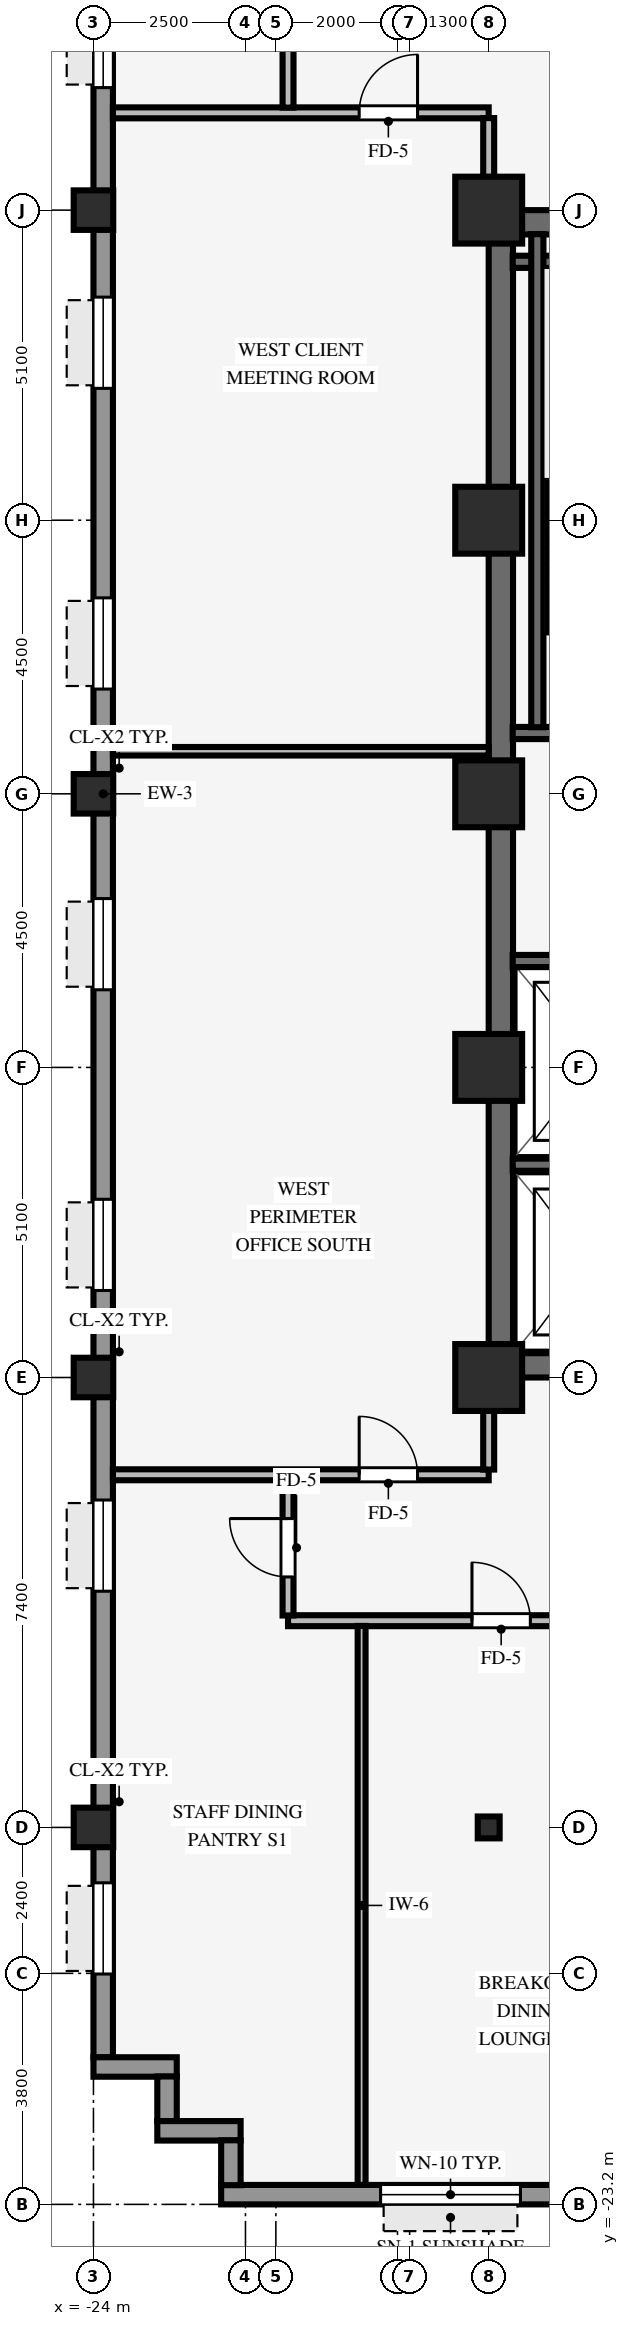
"""IFC4 building model, lengths in metres.
Left out: names, types, materials, properties, quantities, classifications, styles, units other than length and angle.
Written with IfcOpenShell. Run it as: python <this file> out.ifc"""

import sys

from ifc_helpers import new_model, si_unit, direction, frame, frame_2d, origin, origin_2d, place, context, subcontext, project, spatial, rectangle, hollow_rectangle, i_section, extrude, source, transform, mapped, element, fill, save


model = new_model("IFC4")
c1 = context("Model", 3, precision=1e-05, world=origin(), true_north=direction((0.0, 1.0)))
c2 = subcontext(c1, "Body", "Model", "MODEL_VIEW")
j1 = project(units=[si_unit("LENGTHUNIT", "METRE"), si_unit("PLANEANGLEUNIT", "RADIAN")], contexts=[c1])
p1 = place(None, origin())
s1 = spatial("IfcSite", under=j1, at=p1, CompositionType="ELEMENT")
p2 = place(p1, origin())
s2 = spatial("IfcBuilding", under=s1, at=p2, CompositionType="ELEMENT")
p3 = place(p2, frame((0.0, 0.0, 105.6)))
s3 = spatial("IfcBuildingStorey", under=s2, at=p3, CompositionType="ELEMENT", Elevation=105.6)
for number, where, z_axis, x_axis in (
    (1, (-17.5, -9.4, 0.0), (0.0, 0.0, 1.0), (1.0, 0.0, 0.0)),
    (2, (-17.5, 9.4, 0.0), (0.0, 0.0, 1.0), (1.0, 0.0, 0.0)),
):
    element("IfcWall", number, at=place(p3, frame(where, z_axis=z_axis, x_axis=x_axis)), inside=s3, PredefinedType="SHEAR", context=c2, shape_type="SweptSolid", body=[
        extrude(rectangle(XDim=8.5, YDim=0.4, at=frame_2d((4.25, 0.0))), origin(), (0.0, 0.0, 1.0), 3.37),
    ])
p4 = place(p3, frame((-17.3, -9.205, 0.0), z_axis=(0.0, 0.0, 1.0), x_axis=(0.0, 1.0, 0.0)))
e3 = element("IfcWall", 3, at=p4, inside=s3, PredefinedType="SHEAR", context=c2, shape_type="SweptSolid", body=[
    extrude(rectangle(XDim=18.41, YDim=0.4, at=frame_2d((9.205, 0.0))), origin(), (0.0, 0.0, 1.0), 3.37),
])
for number, where, z_axis, x_axis in (
    (4, (-17.5, -9.6, 0.0), (0.0, 0.0, 1.0), (1.0, 0.0, 0.0)),
    (5, (-17.5, -4.5, 0.0), (0.0, 0.0, 1.0), (1.0, 0.0, 0.0)),
    (6, (-17.5, 4.5, 0.0), (0.0, 0.0, 1.0), (1.0, 0.0, 0.0)),
    (7, (-17.5, 9.6, 0.0), (0.0, 0.0, 1.0), (1.0, 0.0, 0.0)),
    (8, (-17.5, 0.0, 0.0), (0.0, 0.0, 1.0), (1.0, 0.0, 0.0)),
):
    element("IfcColumn", number, at=place(p3, frame(where, z_axis=z_axis, x_axis=x_axis)), inside=s3, PredefinedType="COLUMN", context=c2, shape_type="SweptSolid", body=[
        extrude(rectangle(XDim=1.1, YDim=1.1, at=origin_2d()), origin(), (0.0, 0.0, 1.0), 3.37),
    ])
for number, where, z_axis, x_axis in (
    (9, (-24.0, -17.0, 0.0), (0.0, 0.0, 1.0), (1.0, 0.0, 0.0)),
    (10, (-24.0, -9.6, 0.0), (0.0, 0.0, 1.0), (1.0, 0.0, 0.0)),
    (11, (-24.0, 0.0, 0.0), (0.0, 0.0, 1.0), (1.0, 0.0, 0.0)),
    (12, (-24.0, 9.6, 0.0), (0.0, 0.0, 1.0), (1.0, 0.0, 0.0)),
):
    element("IfcColumn", number, at=place(p3, frame(where, z_axis=z_axis, x_axis=x_axis)), inside=s3, PredefinedType="COLUMN", context=c2, shape_type="SweptSolid", body=[
        extrude(hollow_rectangle(XDim=0.65, YDim=0.65, WallThickness=0.04, InnerFilletRadius=0.04, OuterFilletRadius=0.08, at=origin_2d()), origin(), (0.0, 0.0, 1.0), 3.37),
    ])
p5 = place(p3, frame((-17.5, -17.0, 0.0), z_axis=(0.0, 0.0, 1.0), x_axis=(1.0, 0.0, 0.0)))
e13 = element("IfcColumn", 13, at=p5, inside=s3, PredefinedType="COLUMN", context=c2, shape_type="SweptSolid", body=[
    extrude(i_section(OverallWidth=0.36, OverallDepth=0.36, WebThickness=0.021, FlangeThickness=0.021, FilletRadius=0.018, at=origin_2d()), origin(), (0.0, 0.0, 1.0), 3.37),
])
p6 = place(p3, frame((-21.9, -23.04, 0.0), z_axis=(0.0, 0.0, 1.0), x_axis=(1.0, 0.0, 0.0)))
e14 = element("IfcWall", 14, at=p6, inside=s3, PredefinedType="STANDARD", context=c2, shape_type="SweptSolid", body=[
    extrude(rectangle(XDim=43.8, YDim=0.32, at=frame_2d((21.9, 0.0))), origin(), (0.0, 0.0, 1.0), 2.705),
])
p7 = place(p6, frame((17.58, 0.0, 0.0), z_axis=(0.0, 0.0, 1.0), x_axis=(-1.0, 0.0, 0.0)))
e15 = element("IfcOpeningElement", 15, at=p7, cuts=e14, PredefinedType="OPENING", context=c2, shape_type="SweptSolid", body=[
    extrude(rectangle(XDim=0.98, YDim=2.15, at=frame_2d((0.49, 1.075))), frame((0.0, 0.17, 0.0), z_axis=(0.0, -1.0, 0.0), x_axis=(1.0, 0.0, 0.0)), (0.0, 0.0, 1.0), 0.34),
])
p8 = place(p6, frame((2.622, 0.0, 0.8)))
e16 = element("IfcOpeningElement", 16, at=p8, cuts=e14, PredefinedType="OPENING", context=c2, shape_type="SweptSolid", body=[
    extrude(rectangle(XDim=2.3, YDim=1.62, at=frame_2d((1.15, 0.81))), frame((0.0, 0.17, 0.0), z_axis=(0.0, -1.0, 0.0), x_axis=(1.0, 0.0, 0.0)), (0.0, 0.0, 1.0), 0.34),
])
p9 = place(p6, frame((8.167, 0.0, 0.8)))
e17 = element("IfcOpeningElement", 17, at=p9, cuts=e14, PredefinedType="OPENING", context=c2, shape_type="SweptSolid", body=[
    extrude(rectangle(XDim=2.3, YDim=1.62, at=frame_2d((1.15, 0.81))), frame((0.0, 0.17, 0.0), z_axis=(0.0, -1.0, 0.0), x_axis=(1.0, 0.0, 0.0)), (0.0, 0.0, 1.0), 0.34),
])
p10 = place(p6, frame((24.044, 0.0, 0.8)))
e18 = element("IfcOpeningElement", 18, at=p10, cuts=e14, PredefinedType="OPENING", context=c2, shape_type="SweptSolid", body=[
    extrude(rectangle(XDim=2.3, YDim=1.62, at=frame_2d((1.15, 0.81))), frame((0.0, 0.17, 0.0), z_axis=(0.0, -1.0, 0.0), x_axis=(1.0, 0.0, 0.0)), (0.0, 0.0, 1.0), 0.34),
])
p11 = place(p6, frame((34.233, 0.0, 0.8)))
e19 = element("IfcOpeningElement", 19, at=p11, cuts=e14, PredefinedType="OPENING", context=c2, shape_type="SweptSolid", body=[
    extrude(rectangle(XDim=2.3, YDim=1.62, at=frame_2d((1.15, 0.81))), frame((0.0, 0.17, 0.0), z_axis=(0.0, -1.0, 0.0), x_axis=(1.0, 0.0, 0.0)), (0.0, 0.0, 1.0), 0.34),
])
p12 = place(p6, frame((38.878, 0.0, 0.8)))
e20 = element("IfcOpeningElement", 20, at=p12, cuts=e14, PredefinedType="OPENING", context=c2, shape_type="SweptSolid", body=[
    extrude(rectangle(XDim=2.3, YDim=1.62, at=frame_2d((1.15, 0.81))), frame((0.0, 0.17, 0.0), z_axis=(0.0, -1.0, 0.0), x_axis=(1.0, 0.0, 0.0)), (0.0, 0.0, 1.0), 0.34),
])
p13 = place(p3, frame((-23.84, -20.784, 0.0), z_axis=(0.0, 0.0, 1.0), x_axis=(0.0, 1.0, 0.0)))
e21 = element("IfcWall", 21, at=p13, inside=s3, PredefinedType="STANDARD", context=c2, shape_type="SweptSolid", body=[
    extrude(rectangle(XDim=41.568, YDim=0.32, at=frame_2d((20.784, 0.0))), origin(), (0.0, 0.0, 1.0), 2.705),
])
p14 = place(p13, frame((1.373, 0.0, 0.8)))
e22 = element("IfcOpeningElement", 22, at=p14, cuts=e21, PredefinedType="OPENING", context=c2, shape_type="SweptSolid", body=[
    extrude(rectangle(XDim=1.5, YDim=1.6, at=frame_2d((0.75, 0.8))), frame((0.0, 0.17, 0.0), z_axis=(0.0, -1.0, 0.0), x_axis=(1.0, 0.0, 0.0)), (0.0, 0.0, 1.0), 0.34),
])
p15 = place(p13, frame((7.669, 0.0, 0.8)))
e23 = element("IfcOpeningElement", 23, at=p15, cuts=e21, PredefinedType="OPENING", context=c2, shape_type="SweptSolid", body=[
    extrude(rectangle(XDim=1.5, YDim=1.6, at=frame_2d((0.75, 0.8))), frame((0.0, 0.17, 0.0), z_axis=(0.0, -1.0, 0.0), x_axis=(1.0, 0.0, 0.0)), (0.0, 0.0, 1.0), 0.34),
])
p16 = place(p13, frame((12.615, 0.0, 0.8)))
e24 = element("IfcOpeningElement", 24, at=p16, cuts=e21, PredefinedType="OPENING", context=c2, shape_type="SweptSolid", body=[
    extrude(rectangle(XDim=1.5, YDim=1.6, at=frame_2d((0.75, 0.8))), frame((0.0, 0.17, 0.0), z_axis=(0.0, -1.0, 0.0), x_axis=(1.0, 0.0, 0.0)), (0.0, 0.0, 1.0), 0.34),
])
p17 = place(p13, frame((17.561, 0.0, 0.8)))
e25 = element("IfcOpeningElement", 25, at=p17, cuts=e21, PredefinedType="OPENING", context=c2, shape_type="SweptSolid", body=[
    extrude(rectangle(XDim=1.5, YDim=1.6, at=frame_2d((0.75, 0.8))), frame((0.0, 0.17, 0.0), z_axis=(0.0, -1.0, 0.0), x_axis=(1.0, 0.0, 0.0)), (0.0, 0.0, 1.0), 0.34),
])
p18 = place(p13, frame((22.507, 0.0, 0.8)))
e26 = element("IfcOpeningElement", 26, at=p18, cuts=e21, PredefinedType="OPENING", context=c2, shape_type="SweptSolid", body=[
    extrude(rectangle(XDim=1.5, YDim=1.6, at=frame_2d((0.75, 0.8))), frame((0.0, 0.17, 0.0), z_axis=(0.0, -1.0, 0.0), x_axis=(1.0, 0.0, 0.0)), (0.0, 0.0, 1.0), 0.34),
])
p19 = place(p13, frame((27.453, 0.0, 0.8)))
e27 = element("IfcOpeningElement", 27, at=p19, cuts=e21, PredefinedType="OPENING", context=c2, shape_type="SweptSolid", body=[
    extrude(rectangle(XDim=1.5, YDim=1.6, at=frame_2d((0.75, 0.8))), frame((0.0, 0.17, 0.0), z_axis=(0.0, -1.0, 0.0), x_axis=(1.0, 0.0, 0.0)), (0.0, 0.0, 1.0), 0.34),
])
p20 = place(p13, frame((32.399, 0.0, 0.8)))
e28 = element("IfcOpeningElement", 28, at=p20, cuts=e21, PredefinedType="OPENING", context=c2, shape_type="SweptSolid", body=[
    extrude(rectangle(XDim=1.5, YDim=1.6, at=frame_2d((0.75, 0.8))), frame((0.0, 0.17, 0.0), z_axis=(0.0, -1.0, 0.0), x_axis=(1.0, 0.0, 0.0)), (0.0, 0.0, 1.0), 0.34),
])
p21 = place(p13, frame((38.695, 0.0, 0.8)))
e29 = element("IfcOpeningElement", 29, at=p21, cuts=e21, PredefinedType="OPENING", context=c2, shape_type="SweptSolid", body=[
    extrude(rectangle(XDim=1.5, YDim=1.6, at=frame_2d((0.75, 0.8))), frame((0.0, 0.17, 0.0), z_axis=(0.0, -1.0, 0.0), x_axis=(1.0, 0.0, 0.0)), (0.0, 0.0, 1.0), 0.34),
])
p22 = place(p3, frame((-24.0, -20.94, 0.0), z_axis=(0.0, 0.0, 1.0), x_axis=(1.0, 0.0, 0.0)))
e30 = element("IfcWall", 30, at=p22, inside=s3, PredefinedType="STANDARD", context=c2, shape_type="SweptSolid", body=[
    extrude(rectangle(XDim=1.37, YDim=0.32, at=frame_2d((0.685, 0.0))), origin(), (0.0, 0.0, 1.0), 3.36),
])
p23 = place(p3, frame((-22.79, -21.834, 0.0), z_axis=(0.0, 0.0, 1.0), x_axis=(0.0, 1.0, 0.0)))
e31 = element("IfcWall", 31, at=p23, inside=s3, PredefinedType="STANDARD", context=c2, shape_type="SweptSolid", body=[
    extrude(rectangle(XDim=0.738, YDim=0.32, at=frame_2d((0.369, 0.0))), origin(), (0.0, 0.0, 1.0), 3.36),
])
p24 = place(p3, frame((-22.95, -21.99, 0.0), z_axis=(0.0, 0.0, 1.0), x_axis=(1.0, 0.0, 0.0)))
e32 = element("IfcWall", 32, at=p24, inside=s3, PredefinedType="STANDARD", context=c2, shape_type="SweptSolid", body=[
    extrude(rectangle(XDim=1.37, YDim=0.32, at=frame_2d((0.685, 0.0))), origin(), (0.0, 0.0, 1.0), 3.36),
])
p25 = place(p3, frame((-21.74, -22.884, 0.0), z_axis=(0.0, 0.0, 1.0), x_axis=(0.0, 1.0, 0.0)))
e33 = element("IfcWall", 33, at=p25, inside=s3, PredefinedType="STANDARD", context=c2, shape_type="SweptSolid", body=[
    extrude(rectangle(XDim=0.738, YDim=0.32, at=frame_2d((0.369, 0.0))), origin(), (0.0, 0.0, 1.0), 3.36),
])
for number, where, z_axis, x_axis in (
    (34, (-17.105, 1.0, 0.0), (0.0, 0.0, 1.0), (1.0, 0.0, 0.0)),
    (35, (-17.105, 8.75, 0.0), (0.0, 0.0, 1.0), (1.0, 0.0, 0.0)),
):
    element("IfcWall", number, at=place(p3, frame(where, z_axis=z_axis, x_axis=x_axis)), inside=s3, PredefinedType="SHEAR", context=c2, shape_type="SweptSolid", body=[
        extrude(rectangle(XDim=3.57, YDim=0.2, at=frame_2d((1.785, 0.0))), origin(), (0.0, 0.0, 1.0), 3.37),
    ])
p26 = place(p3, frame((-16.7, 1.095, 0.0), z_axis=(0.0, 0.0, 1.0), x_axis=(0.0, 1.0, 0.0)))
e36 = element("IfcWall", 36, at=p26, inside=s3, PredefinedType="SHEAR", context=c2, shape_type="SweptSolid", body=[
    extrude(rectangle(XDim=8.11, YDim=0.2, at=frame_2d((4.055, 0.0))), origin(), (0.0, 0.0, 1.0), 3.37),
])
p27 = place(p3, frame((-17.105, -6.1, 0.0), z_axis=(0.0, 0.0, 1.0), x_axis=(1.0, 0.0, 0.0)))
e37 = element("IfcWall", 37, at=p27, inside=s3, PredefinedType="SHEAR", context=c2, shape_type="SweptSolid", body=[
    extrude(rectangle(XDim=2.855, YDim=0.2, at=frame_2d((1.427, 0.0))), origin(), (0.0, 0.0, 1.0), 3.37),
])
p28 = place(p3, frame((-17.105, -2.75, 0.0), z_axis=(0.0, 0.0, 1.0), x_axis=(1.0, 0.0, 0.0)))
e38 = element("IfcWall", 38, at=p28, inside=s3, PredefinedType="SHEAR", context=c2, shape_type="SweptSolid", body=[
    extrude(rectangle(XDim=2.66, YDim=0.2, at=frame_2d((1.33, 0.0))), origin(), (0.0, 0.0, 1.0), 3.37),
])
p29 = place(p3, frame((-20.8, -13.6, 0.0), z_axis=(0.0, 0.0, 1.0), x_axis=(1.0, 0.0, 0.0)))
e39 = element("IfcWall", 39, at=p29, inside=s3, PredefinedType="PARTITIONING", context=c2, shape_type="SweptSolid", body=[
    extrude(rectangle(XDim=5.8, YDim=0.18, at=frame_2d((2.9, 0.0))), origin(), (0.0, 0.0, 1.0), 2.998),
])
p30 = place(p29, frame((3.025, 0.0, 0.0)))
e40 = element("IfcOpeningElement", 40, at=p30, cuts=e39, PredefinedType="OPENING", context=c2, shape_type="SweptSolid", body=[
    extrude(rectangle(XDim=0.96, YDim=2.1, at=frame_2d((0.48, 1.05))), frame((0.0, 0.1, 0.0), z_axis=(0.0, -1.0, 0.0), x_axis=(1.0, 0.0, 0.0)), (0.0, 0.0, 1.0), 0.2),
])
p31 = place(p3, frame((-23.68, -11.2, 0.0), z_axis=(0.0, 0.0, 1.0), x_axis=(1.0, 0.0, 0.0)))
e41 = element("IfcWall", 41, at=p31, inside=s3, PredefinedType="PARTITIONING", context=c2, shape_type="SweptSolid", body=[
    extrude(rectangle(XDim=6.18, YDim=0.18, at=frame_2d((3.09, 0.0))), origin(), (0.0, 0.0, 1.0), 3.36),
])
p32 = place(p31, frame((4.05, 0.0, 0.0)))
e42 = element("IfcOpeningElement", 42, at=p32, cuts=e41, PredefinedType="OPENING", context=c2, shape_type="SweptSolid", body=[
    extrude(rectangle(XDim=0.96, YDim=2.1, at=frame_2d((0.48, 1.05))), frame((0.0, 0.1, 0.0), z_axis=(0.0, -1.0, 0.0), x_axis=(1.0, 0.0, 0.0)), (0.0, 0.0, 1.0), 0.2),
])
p33 = place(p3, frame((-23.68, 0.7, 0.0), z_axis=(0.0, 0.0, 1.0), x_axis=(1.0, 0.0, 0.0)))
e43 = element("IfcWall", 43, at=p33, inside=s3, PredefinedType="PARTITIONING", context=c2, shape_type="SweptSolid", body=[
    extrude(rectangle(XDim=6.18, YDim=0.14, at=frame_2d((3.09, 0.0))), origin(), (0.0, 0.0, 1.0), 3.36),
])
p34 = place(p3, frame((-23.68, 11.2, 0.0), z_axis=(0.0, 0.0, 1.0), x_axis=(1.0, 0.0, 0.0)))
e44 = element("IfcWall", 44, at=p34, inside=s3, PredefinedType="PARTITIONING", context=c2, shape_type="SweptSolid", body=[
    extrude(rectangle(XDim=6.18, YDim=0.18, at=frame_2d((3.09, 0.0))), origin(), (0.0, 0.0, 1.0), 3.36),
])
p35 = place(p34, frame((4.05, 0.0, 0.0)))
e45 = element("IfcOpeningElement", 45, at=p35, cuts=e44, PredefinedType="OPENING", context=c2, shape_type="SweptSolid", body=[
    extrude(rectangle(XDim=0.96, YDim=2.1, at=frame_2d((0.48, 1.05))), frame((0.0, 0.1, 0.0), z_axis=(0.0, -1.0, 0.0), x_axis=(1.0, 0.0, 0.0)), (0.0, 0.0, 1.0), 0.2),
])
p36 = place(p3, frame((-20.8, -13.514, 0.0), z_axis=(0.0, 0.0, 1.0), x_axis=(0.0, 1.0, 0.0)))
e46 = element("IfcWall", 46, at=p36, inside=s3, PredefinedType="PARTITIONING", context=c2, shape_type="SweptSolid", body=[
    extrude(rectangle(XDim=2.228, YDim=0.18, at=frame_2d((1.114, 0.0))), origin(), (0.0, 0.0, 1.0), 3.36),
])
p37 = place(p36, frame((0.634, 0.0, 0.0)))
e47 = element("IfcOpeningElement", 47, at=p37, cuts=e46, PredefinedType="OPENING", context=c2, shape_type="SweptSolid", body=[
    extrude(rectangle(XDim=0.96, YDim=2.1, at=frame_2d((0.48, 1.05))), frame((0.0, 0.1, 0.0), z_axis=(0.0, -1.0, 0.0), x_axis=(1.0, 0.0, 0.0)), (0.0, 0.0, 1.0), 0.2),
])
p38 = place(p3, frame((-20.8, 11.286, 0.0), z_axis=(0.0, 0.0, 1.0), x_axis=(0.0, 1.0, 0.0)))
e48 = element("IfcWall", 48, at=p38, inside=s3, PredefinedType="PARTITIONING", context=c2, shape_type="SweptSolid", body=[
    extrude(rectangle(XDim=2.228, YDim=0.18, at=frame_2d((1.114, 0.0))), origin(), (0.0, 0.0, 1.0), 3.36),
])
p39 = place(p3, frame((-19.59, -22.88, 0.0), z_axis=(0.0, 0.0, 1.0), x_axis=(0.0, 1.0, 0.0)))
e49 = element("IfcWall", 49, at=p39, inside=s3, PredefinedType="PARTITIONING", context=c2, shape_type="SweptSolid", body=[
    extrude(rectangle(XDim=9.194, YDim=0.13, at=frame_2d((4.597, 0.0))), origin(), (0.0, 0.0, 1.0), 3.36),
])
for number, where, z_axis, x_axis in (
    (50, (-17.5, -11.114, 0.0), (0.0, 0.0, 1.0), (0.0, 1.0, 0.0)),
    (51, (-17.5, 10.146, 0.0), (0.0, 0.0, 1.0), (0.0, 1.0, 0.0)),
):
    element("IfcWall", number, at=place(p3, frame(where, z_axis=z_axis, x_axis=x_axis)), inside=s3, PredefinedType="PARTITIONING", context=c2, shape_type="SweptSolid", body=[
        extrude(rectangle(XDim=0.968, YDim=0.18, at=frame_2d((0.484, 0.0))), origin(), (0.0, 0.0, 1.0), 2.738),
    ])
m1 = source(origin(), c2, "Body", "SweptSolid", [
    extrude(rectangle(XDim=2.3, YDim=1.62, at=frame_2d((1.15, 0.81))), frame((0.0, 0.03, 0.0), z_axis=(0.0, -1.0, 0.0), x_axis=(1.0, 0.0, 0.0)), (0.0, 0.0, 1.0), 0.06),
])
p40 = place(p8, origin())
e52 = element("IfcWindow", 52, at=p40, inside=s3, PartitioningType="SINGLE_PANEL", PredefinedType="WINDOW", context=c2, shape_type="MappedRepresentation", body=[
    mapped(m1, transform((0.0, 0.0, 0.0), scale=1.0)),
])
fill(e16, e52)
m2 = source(origin(), c2, "Body", "SweptSolid", [
    extrude(rectangle(XDim=1.5, YDim=1.6, at=frame_2d((0.75, 0.8))), frame((0.0, 0.03, 0.0), z_axis=(0.0, -1.0, 0.0), x_axis=(1.0, 0.0, 0.0)), (0.0, 0.0, 1.0), 0.06),
])
p41 = place(p14, origin())
e53 = element("IfcWindow", 53, at=p41, inside=s3, PartitioningType="SINGLE_PANEL", PredefinedType="WINDOW", context=c2, shape_type="MappedRepresentation", body=[
    mapped(m2, transform((0.0, 0.0, 0.0), scale=1.0)),
])
fill(e22, e53)
p42 = place(p15, origin())
e54 = element("IfcWindow", 54, at=p42, inside=s3, PartitioningType="SINGLE_PANEL", PredefinedType="WINDOW", context=c2, shape_type="MappedRepresentation", body=[
    mapped(m2, transform((0.0, 0.0, 0.0), scale=1.0)),
])
fill(e23, e54)
p43 = place(p16, origin())
e55 = element("IfcWindow", 55, at=p43, inside=s3, PartitioningType="SINGLE_PANEL", PredefinedType="WINDOW", context=c2, shape_type="MappedRepresentation", body=[
    mapped(m2, transform((0.0, 0.0, 0.0), scale=1.0)),
])
fill(e24, e55)
p44 = place(p17, origin())
e56 = element("IfcWindow", 56, at=p44, inside=s3, PartitioningType="SINGLE_PANEL", PredefinedType="WINDOW", context=c2, shape_type="MappedRepresentation", body=[
    mapped(m2, transform((0.0, 0.0, 0.0), scale=1.0)),
])
fill(e25, e56)
p45 = place(p18, origin())
e57 = element("IfcWindow", 57, at=p45, inside=s3, PartitioningType="SINGLE_PANEL", PredefinedType="WINDOW", context=c2, shape_type="MappedRepresentation", body=[
    mapped(m2, transform((0.0, 0.0, 0.0), scale=1.0)),
])
fill(e26, e57)
p46 = place(p19, origin())
e58 = element("IfcWindow", 58, at=p46, inside=s3, PartitioningType="SINGLE_PANEL", PredefinedType="WINDOW", context=c2, shape_type="MappedRepresentation", body=[
    mapped(m2, transform((0.0, 0.0, 0.0), scale=1.0)),
])
fill(e27, e58)
p47 = place(p20, origin())
e59 = element("IfcWindow", 59, at=p47, inside=s3, PartitioningType="SINGLE_PANEL", PredefinedType="WINDOW", context=c2, shape_type="MappedRepresentation", body=[
    mapped(m2, transform((0.0, 0.0, 0.0), scale=1.0)),
])
fill(e28, e59)
m3 = source(origin(), c2, "Body", "SweptSolid", [
    extrude(rectangle(XDim=0.96, YDim=2.1, at=frame_2d((0.48, 1.05))), frame((0.0, 0.025, 0.0), z_axis=(0.0, -1.0, 0.0), x_axis=(1.0, 0.0, 0.0)), (0.0, 0.0, 1.0), 0.05),
])
p48 = place(p30, origin())
e60 = element("IfcDoor", 60, at=p48, inside=s3, OperationType="SINGLE_SWING_LEFT", PredefinedType="DOOR", context=c2, shape_type="MappedRepresentation", body=[
    mapped(m3, transform((0.0, 0.0, 0.0), scale=1.0)),
])
fill(e40, e60)
p49 = place(p32, origin())
e61 = element("IfcDoor", 61, at=p49, inside=s3, OperationType="SINGLE_SWING_LEFT", PredefinedType="DOOR", context=c2, shape_type="MappedRepresentation", body=[
    mapped(m3, transform((0.0, 0.0, 0.0), scale=1.0)),
])
fill(e42, e61)
p50 = place(p35, origin())
e62 = element("IfcDoor", 62, at=p50, inside=s3, OperationType="SINGLE_SWING_RIGHT", PredefinedType="DOOR", context=c2, shape_type="MappedRepresentation", body=[
    mapped(m3, transform((0.0, 0.0, 0.0), scale=1.0)),
])
fill(e45, e62)
p51 = place(p37, origin())
e63 = element("IfcDoor", 63, at=p51, inside=s3, OperationType="SINGLE_SWING_RIGHT", PredefinedType="DOOR", context=c2, shape_type="MappedRepresentation", body=[
    mapped(m3, transform((0.0, 0.0, 0.0), scale=1.0)),
])
fill(e47, e63)
save(model, sys.argv[1])
